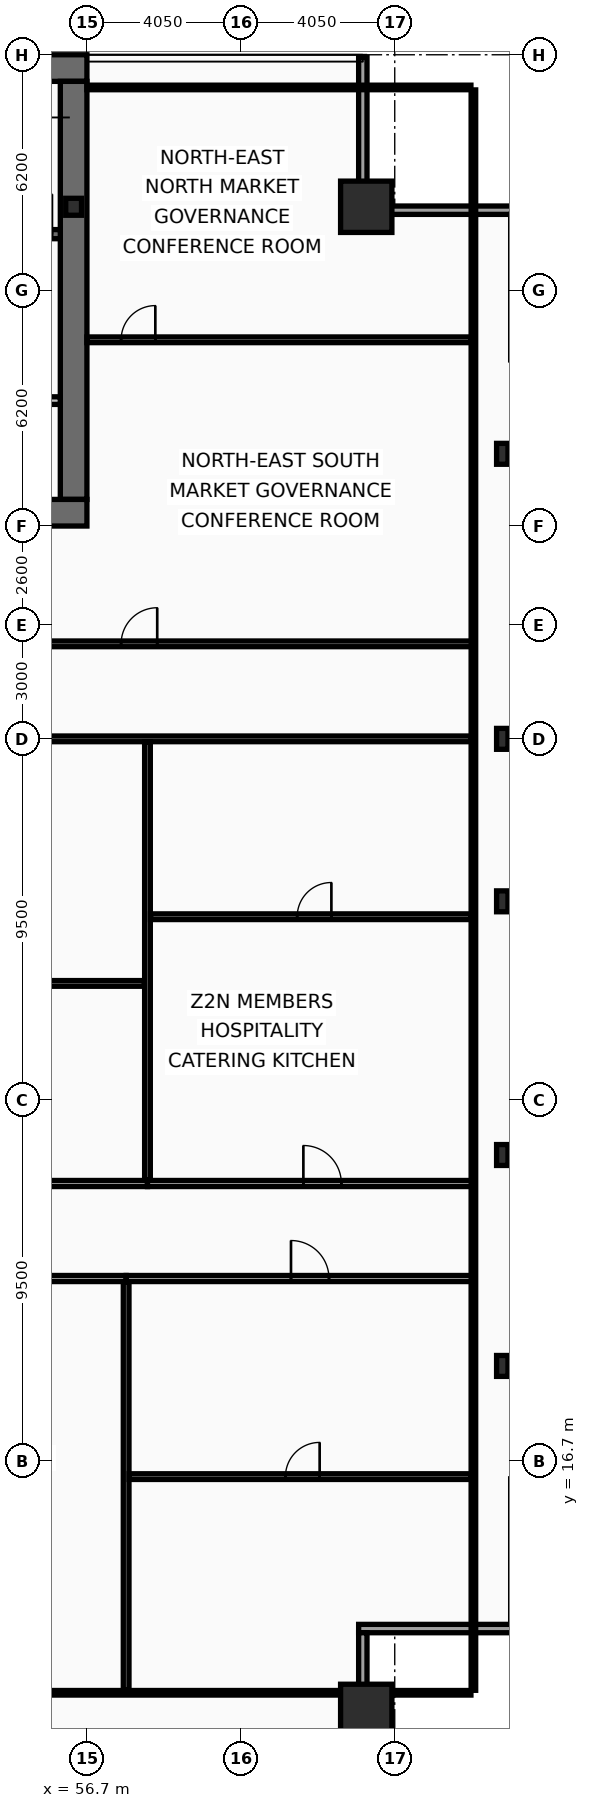
"""IFC4 building model, lengths in metres.
Left out: names, types, materials, properties, quantities, classifications, styles, units other than length and angle.
Written with IfcOpenShell. Run it as: python <this file> out.ifc"""

import sys

from ifc_helpers import new_model, si_unit, direction, frame, frame_2d, origin, origin_2d, place, context, subcontext, project, spatial, rectangle, hollow_rectangle, i_section, extrude, element, fill, save


model = new_model("IFC4")
c1 = context("Model", 3, precision=1e-05, world=origin(), true_north=direction((0.0, 1.0)))
c2 = subcontext(c1, "Body", "Model", "MODEL_VIEW")
j1 = project(units=[si_unit("LENGTHUNIT", "METRE"), si_unit("PLANEANGLEUNIT", "RADIAN")], contexts=[c1])
p1 = place(None, origin())
s1 = spatial("IfcSite", under=j1, at=p1, CompositionType="ELEMENT")
p2 = place(p1, origin())
s2 = spatial("IfcBuilding", under=s1, at=p2, CompositionType="ELEMENT")
p3 = place(p2, frame((0.0, 0.0, 161.4)))
s3 = spatial("IfcBuildingStorey", under=s2, at=p3, CompositionType="ELEMENT", Elevation=161.4)
p4 = place(p3, frame((16.2, 53.35, 0.0), z_axis=(0.0, 0.0, 1.0), x_axis=(1.0, 0.0, 0.0)))
e1 = element("IfcWall", 1, at=p4, inside=s3, PredefinedType="SHEAR", context=c2, shape_type="SweptSolid", body=[
    extrude(rectangle(XDim=40.5, YDim=0.7, at=frame_2d((20.25, 0.0))), origin(), (0.0, 0.0, 1.0), 3.44),
])
p5 = place(p3, frame((56.35, 53.0, 0.0), z_axis=(0.0, 0.0, 1.0), x_axis=(0.0, -1.0, 0.0)))
e2 = element("IfcWall", 2, at=p5, inside=s3, PredefinedType="SHEAR", context=c2, shape_type="SweptSolid", body=[
    extrude(rectangle(XDim=11.0, YDim=0.7, at=frame_2d((5.5, 0.0))), origin(), (0.0, 0.0, 1.0), 3.44),
])
p6 = place(p3, frame((56.7, 41.65, 0.0), z_axis=(0.0, 0.0, 1.0), x_axis=(-1.0, 0.0, 0.0)))
e3 = element("IfcWall", 3, at=p6, inside=s3, PredefinedType="SHEAR", context=c2, shape_type="SweptSolid", body=[
    extrude(rectangle(XDim=2.45, YDim=0.7, at=frame_2d((1.225, 0.0))), origin(), (0.0, 0.0, 1.0), 3.44),
])
p7 = place(p3, frame((48.63, 48.98, 0.0), z_axis=(0.0, 0.0, 1.0), x_axis=(1.0, 0.0, 0.0)))
e4 = element("IfcWall", 4, at=p7, inside=s3, PredefinedType="SHEAR", context=c2, shape_type="SweptSolid", body=[
    extrude(rectangle(XDim=7.37, YDim=0.24, at=frame_2d((3.685, 0.0))), origin(), (0.0, 0.0, 1.0), 3.44),
])
p8 = place(p7, frame((6.1, 0.0, 0.0)))
e5 = element("IfcOpeningElement", 5, at=p8, cuts=e4, PredefinedType="OPENING", context=c2, shape_type="SweptSolid", body=[
    extrude(rectangle(XDim=1.05, YDim=2.15, at=frame_2d((0.525, 1.075))), frame((0.0, 0.13, 0.0), z_axis=(0.0, -1.0, 0.0), x_axis=(1.0, 0.0, 0.0)), (0.0, 0.0, 1.0), 0.26),
])
for number, where, z_axis, x_axis in (
    (6, (64.05, 10.15, 0.0), (0.0, 0.0, 1.0), (1.0, 0.0, 0.0)),
    (7, (64.05, 49.7, 0.0), (0.0, 0.0, 1.0), (1.0, 0.0, 0.0)),
):
    element("IfcColumn", number, at=place(p3, frame(where, z_axis=z_axis, x_axis=x_axis)), inside=s3, PredefinedType="COLUMN", context=c2, shape_type="SweptSolid", body=[
        extrude(hollow_rectangle(XDim=1.35, YDim=1.35, WallThickness=0.065, at=origin_2d()), origin(), (0.0, 0.0, 1.0), 3.6),
    ])
for number, where, z_axis, x_axis in (
    (8, (67.63, 19.2, 0.0), (0.0, 0.0, 1.0), (1.0, 0.0, 0.0)),
    (9, (67.63, 24.75, 0.0), (0.0, 0.0, 1.0), (1.0, 0.0, 0.0)),
    (10, (67.63, 31.425, 0.0), (0.0, 0.0, 1.0), (1.0, 0.0, 0.0)),
    (11, (67.63, 35.7, 0.0), (0.0, 0.0, 1.0), (1.0, 0.0, 0.0)),
    (12, (67.63, 43.2, 0.0), (0.0, 0.0, 1.0), (1.0, 0.0, 0.0)),
):
    element("IfcColumn", number, at=place(p3, frame(where, z_axis=z_axis, x_axis=x_axis)), inside=s3, PredefinedType="COLUMN", context=c2, shape_type="SweptSolid", body=[
        extrude(i_section(OverallWidth=0.3, OverallDepth=0.55, WebThickness=0.015, FlangeThickness=0.029, at=origin_2d()), origin(), (0.0, 0.0, 1.0), 3.6),
    ])
p9 = place(p3, frame((56.35, 49.7, 0.0), z_axis=(0.0, 0.0, 1.0), x_axis=(1.0, 0.0, 0.0)))
e13 = element("IfcColumn", 13, at=p9, inside=s3, PredefinedType="COLUMN", context=c2, shape_type="SweptSolid", body=[
    extrude(i_section(OverallWidth=0.416, OverallDepth=0.446, WebThickness=0.039, FlangeThickness=0.063, at=origin_2d()), origin(), (0.0, 0.0, 1.0), 3.6),
])
p10 = place(p3, frame((63.96, 53.63, 0.0), z_axis=(0.0, 0.0, 1.0), x_axis=(0.0, -1.0, 0.0)))
e14 = element("IfcWall", 14, at=p10, inside=s3, PredefinedType="SOLIDWALL", context=c2, shape_type="SweptSolid", body=[
    extrude(rectangle(XDim=3.91, YDim=0.22, at=frame_2d((1.955, 0.0))), origin(), (0.0, 0.0, 1.0), 2.83),
])
for number, where, z_axis, x_axis in (
    (15, (63.85, 49.61, 0.0), (0.0, 0.0, 1.0), (1.0, 0.0, 0.0)),
    (16, (68.07, 12.29, 0.0), (0.0, 0.0, 1.0), (-1.0, 0.0, 0.0)),
):
    element("IfcWall", number, at=place(p3, frame(where, z_axis=z_axis, x_axis=x_axis)), inside=s3, PredefinedType="SOLIDWALL", context=c2, shape_type="SweptSolid", body=[
        extrude(rectangle(XDim=4.22, YDim=0.22, at=frame_2d((2.11, 0.0))), origin(), (0.0, 0.0, 1.0), 2.83),
    ])
p11 = place(p3, frame((63.96, 12.18, 0.0), z_axis=(0.0, 0.0, 1.0), x_axis=(0.0, -1.0, 0.0)))
e17 = element("IfcWall", 17, at=p11, inside=s3, PredefinedType="SOLIDWALL", context=c2, shape_type="SweptSolid", body=[
    extrude(rectangle(XDim=3.91, YDim=0.22, at=frame_2d((1.955, 0.0))), origin(), (0.0, 0.0, 1.0), 2.83),
])
p12 = place(p3, frame((51.9, 44.6, 0.0), z_axis=(0.0, 0.0, 1.0), x_axis=(1.0, 0.0, 0.0)))
e18 = element("IfcWall", 18, at=p12, inside=s3, PredefinedType="PARTITIONING", context=c2, shape_type="SweptSolid", body=[
    extrude(rectangle(XDim=4.1, YDim=0.2, at=frame_2d((2.05, 0.0))), origin(), (0.0, 0.0, 1.0), 3.44),
])
p13 = place(p12, frame((1.15, 0.0, 0.0)))
e19 = element("IfcOpeningElement", 19, at=p13, cuts=e18, PredefinedType="OPENING", context=c2, shape_type="SweptSolid", body=[
    extrude(rectangle(XDim=1.05, YDim=2.15, at=frame_2d((0.525, 1.075))), frame((0.0, 0.11, 0.0), z_axis=(0.0, -1.0, 0.0), x_axis=(1.0, 0.0, 0.0)), (0.0, 0.0, 1.0), 0.22),
])
p14 = place(p3, frame((54.35, 38.2, 0.0), z_axis=(0.0, 0.0, 1.0), x_axis=(1.0, 0.0, 0.0)))
e20 = element("IfcWall", 20, at=p14, inside=s3, PredefinedType="PARTITIONING", context=c2, shape_type="SweptSolid", body=[
    extrude(rectangle(XDim=12.52, YDim=0.15, at=frame_2d((6.26, 0.0))), origin(), (0.0, 0.0, 1.0), 2.73),
])
p15 = place(p14, frame((3.25, 0.0, 0.0)))
e21 = element("IfcOpeningElement", 21, at=p15, cuts=e20, PredefinedType="OPENING", context=c2, shape_type="SweptSolid", body=[
    extrude(rectangle(XDim=0.95, YDim=2.05, at=frame_2d((0.475, 1.025))), frame((0.0, 0.085, 0.0), z_axis=(0.0, -1.0, 0.0), x_axis=(1.0, 0.0, 0.0)), (0.0, 0.0, 1.0), 0.17),
])
p16 = place(p3, frame((56.7, 46.2, 0.0), z_axis=(0.0, 0.0, 1.0), x_axis=(1.0, 0.0, 0.0)))
e22 = element("IfcWall", 22, at=p16, inside=s3, PredefinedType="PARTITIONING", context=c2, shape_type="SweptSolid", body=[
    extrude(rectangle(XDim=10.105, YDim=0.15, at=frame_2d((5.052, 0.0))), origin(), (0.0, 0.0, 1.0), 2.83),
])
p17 = place(p16, frame((0.9, 0.0, 0.0)))
e23 = element("IfcOpeningElement", 23, at=p17, cuts=e22, PredefinedType="OPENING", context=c2, shape_type="SweptSolid", body=[
    extrude(rectangle(XDim=0.9, YDim=2.05, at=frame_2d((0.45, 1.025))), frame((0.0, 0.085, 0.0), z_axis=(0.0, -1.0, 0.0), x_axis=(1.0, 0.0, 0.0)), (0.0, 0.0, 1.0), 0.17),
])
p18 = place(p3, frame((49.632, 21.5, 0.0), z_axis=(0.0, 0.0, 1.0), x_axis=(1.0, 0.0, 0.0)))
e24 = element("IfcWall", 24, at=p18, inside=s3, PredefinedType="PARTITIONING", context=c2, shape_type="SweptSolid", body=[
    extrude(rectangle(XDim=8.1, YDim=0.16, at=frame_2d((4.05, 0.0))), origin(), (0.0, 0.0, 1.0), 2.73),
])
p19 = place(p18, frame((3.902, 0.0, 0.0)))
e25 = element("IfcOpeningElement", 25, at=p19, cuts=e24, PredefinedType="OPENING", context=c2, shape_type="SweptSolid", body=[
    extrude(rectangle(XDim=1.0, YDim=2.05, at=frame_2d((0.5, 1.025))), frame((0.0, 0.09, 0.0), z_axis=(0.0, -1.0, 0.0), x_axis=(1.0, 0.0, 0.0)), (0.0, 0.0, 1.0), 0.18),
])
p20 = place(p3, frame((57.732, 21.5, 0.0), z_axis=(0.0, 0.0, 1.0), x_axis=(1.0, 0.0, 0.0)))
e26 = element("IfcWall", 26, at=p20, inside=s3, PredefinedType="PARTITIONING", context=c2, shape_type="SweptSolid", body=[
    extrude(rectangle(XDim=9.138, YDim=0.16, at=frame_2d((4.569, 0.0))), origin(), (0.0, 0.0, 1.0), 3.44),
])
p21 = place(p20, frame((4.338, 0.0, 0.0)))
e27 = element("IfcOpeningElement", 27, at=p21, cuts=e26, PredefinedType="OPENING", context=c2, shape_type="SweptSolid", body=[
    extrude(rectangle(XDim=1.0, YDim=2.05, at=frame_2d((0.5, 1.025))), frame((0.0, 0.09, 0.0), z_axis=(0.0, -1.0, 0.0), x_axis=(1.0, 0.0, 0.0)), (0.0, 0.0, 1.0), 0.18),
])
p22 = place(p3, frame((57.732, 10.665, 0.0), z_axis=(0.0, 0.0, 1.0), x_axis=(0.0, 1.0, 0.0)))
e28 = element("IfcWall", 28, at=p22, inside=s3, PredefinedType="PARTITIONING", context=c2, shape_type="SweptSolid", body=[
    extrude(rectangle(XDim=10.75, YDim=0.15, at=frame_2d((5.375, 0.0))), origin(), (0.0, 0.0, 1.0), 2.73),
])
p23 = place(p3, frame((57.812, 16.288, 0.0), z_axis=(0.0, 0.0, 1.0), x_axis=(1.0, 0.0, 0.0)))
e29 = element("IfcWall", 29, at=p23, inside=s3, PredefinedType="PARTITIONING", context=c2, shape_type="SweptSolid", body=[
    extrude(rectangle(XDim=8.993, YDim=0.15, at=frame_2d((4.497, 0.0))), origin(), (0.0, 0.0, 1.0), 2.83),
])
p24 = place(p23, frame((4.112, 0.0, 0.0)))
e30 = element("IfcOpeningElement", 30, at=p24, cuts=e29, PredefinedType="OPENING", context=c2, shape_type="SweptSolid", body=[
    extrude(rectangle(XDim=0.9, YDim=2.05, at=frame_2d((0.45, 1.025))), frame((0.0, 0.085, 0.0), z_axis=(0.0, -1.0, 0.0), x_axis=(1.0, 0.0, 0.0)), (0.0, 0.0, 1.0), 0.17),
])
p25 = place(p3, frame((21.81, 35.7, 0.0), z_axis=(0.0, 0.0, 1.0), x_axis=(1.0, 0.0, 0.0)))
e31 = element("IfcWall", 31, at=p25, inside=s3, PredefinedType="PARTITIONING", context=c2, shape_type="SweptSolid", body=[
    extrude(rectangle(XDim=44.995, YDim=0.15, at=frame_2d((22.498, 0.0))), origin(), (0.0, 0.0, 1.0), 2.73),
])
p26 = place(p3, frame((48.814, 24.0, 0.0), z_axis=(0.0, 0.0, 1.0), x_axis=(1.0, 0.0, 0.0)))
e32 = element("IfcWall", 32, at=p26, inside=s3, PredefinedType="PARTITIONING", context=c2, shape_type="SweptSolid", body=[
    extrude(rectangle(XDim=9.479, YDim=0.16, at=frame_2d((4.74, 0.0))), origin(), (0.0, 0.0, 1.0), 2.73),
])
p27 = place(p26, frame((4.481, 0.0, 0.0)))
e33 = element("IfcOpeningElement", 33, at=p27, cuts=e32, PredefinedType="OPENING", context=c2, shape_type="SweptSolid", body=[
    extrude(rectangle(XDim=1.0, YDim=2.05, at=frame_2d((0.5, 1.025))), frame((0.0, 0.09, 0.0), z_axis=(0.0, -1.0, 0.0), x_axis=(1.0, 0.0, 0.0)), (0.0, 0.0, 1.0), 0.18),
])
p28 = place(p3, frame((48.894, 29.265, 0.0), z_axis=(0.0, 0.0, 1.0), x_axis=(1.0, 0.0, 0.0)))
e34 = element("IfcWall", 34, at=p28, inside=s3, PredefinedType="PARTITIONING", context=c2, shape_type="SweptSolid", body=[
    extrude(rectangle(XDim=9.319, YDim=0.15, at=frame_2d((4.66, 0.0))), origin(), (0.0, 0.0, 1.0), 2.73),
])
p29 = place(p28, frame((4.266, 0.0, 0.0)))
e35 = element("IfcOpeningElement", 35, at=p29, cuts=e34, PredefinedType="OPENING", context=c2, shape_type="SweptSolid", body=[
    extrude(rectangle(XDim=0.9, YDim=2.05, at=frame_2d((0.45, 1.025))), frame((0.0, 0.085, 0.0), z_axis=(0.0, -1.0, 0.0), x_axis=(1.0, 0.0, 0.0)), (0.0, 0.0, 1.0), 0.17),
])
p30 = place(p3, frame((58.293, 24.0, 0.0), z_axis=(0.0, 0.0, 1.0), x_axis=(1.0, 0.0, 0.0)))
e36 = element("IfcWall", 36, at=p30, inside=s3, PredefinedType="PARTITIONING", context=c2, shape_type="SweptSolid", body=[
    extrude(rectangle(XDim=8.577, YDim=0.16, at=frame_2d((4.288, 0.0))), origin(), (0.0, 0.0, 1.0), 3.44),
])
p31 = place(p30, frame((4.102, 0.0, 0.0)))
e37 = element("IfcOpeningElement", 37, at=p31, cuts=e36, PredefinedType="OPENING", context=c2, shape_type="SweptSolid", body=[
    extrude(rectangle(XDim=1.0, YDim=2.05, at=frame_2d((0.5, 1.025))), frame((0.0, 0.09, 0.0), z_axis=(0.0, -1.0, 0.0), x_axis=(1.0, 0.0, 0.0)), (0.0, 0.0, 1.0), 0.18),
])
p32 = place(p3, frame((58.293, 24.085, 0.0), z_axis=(0.0, 0.0, 1.0), x_axis=(0.0, 1.0, 0.0)))
e38 = element("IfcWall", 38, at=p32, inside=s3, PredefinedType="PARTITIONING", context=c2, shape_type="SweptSolid", body=[
    extrude(rectangle(XDim=11.535, YDim=0.15, at=frame_2d((5.768, 0.0))), origin(), (0.0, 0.0, 1.0), 2.73),
])
p33 = place(p3, frame((58.373, 31.02, 0.0), z_axis=(0.0, 0.0, 1.0), x_axis=(1.0, 0.0, 0.0)))
e39 = element("IfcWall", 39, at=p33, inside=s3, PredefinedType="PARTITIONING", context=c2, shape_type="SweptSolid", body=[
    extrude(rectangle(XDim=8.432, YDim=0.15, at=frame_2d((4.216, 0.0))), origin(), (0.0, 0.0, 1.0), 2.73),
])
p34 = place(p33, frame((3.86, 0.0, 0.0)))
e40 = element("IfcOpeningElement", 40, at=p34, cuts=e39, PredefinedType="OPENING", context=c2, shape_type="SweptSolid", body=[
    extrude(rectangle(XDim=0.9, YDim=2.05, at=frame_2d((0.45, 1.025))), frame((0.0, 0.085, 0.0), z_axis=(0.0, -1.0, 0.0), x_axis=(1.0, 0.0, 0.0)), (0.0, 0.0, 1.0), 0.17),
])
p35 = place(p3, frame((66.87, 10.665, 0.0), z_axis=(0.0, 0.0, 1.0), x_axis=(0.0, 1.0, 0.0)))
e41 = element("IfcWall", 41, at=p35, inside=s3, PredefinedType="PARTITIONING", context=c2, shape_type="SweptSolid", body=[
    extrude(rectangle(XDim=42.11, YDim=0.12, at=frame_2d((21.055, 0.0))), origin(), (0.0, 0.0, 1.0), 2.73),
])
p36 = place(p3, frame((56.7, 52.84, 0.0), z_axis=(0.0, 0.0, 1.0), x_axis=(1.0, 0.0, 0.0)))
e42 = element("IfcWall", 42, at=p36, inside=s3, PredefinedType="PARTITIONING", context=c2, shape_type="SweptSolid", body=[
    extrude(rectangle(XDim=10.105, YDim=0.12, at=frame_2d((5.052, 0.0))), origin(), (0.0, 0.0, 1.0), 3.44),
])
p37 = place(p3, frame((6.095, 10.6, 0.0), z_axis=(0.0, 0.0, 1.0), x_axis=(1.0, 0.0, 0.0)))
e43 = element("IfcWall", 43, at=p37, inside=s3, PredefinedType="PARTITIONING", context=c2, shape_type="SweptSolid", body=[
    extrude(rectangle(XDim=60.71, YDim=0.12, at=frame_2d((30.355, 0.0))), origin(), (0.0, 0.0, 1.0), 2.73),
])
p38 = place(p15, origin())
e44 = element("IfcDoor", 44, at=p38, inside=s3, OperationType="SINGLE_SWING_RIGHT", PredefinedType="DOOR", context=c2, shape_type="SweptSolid", body=[
    extrude(rectangle(XDim=0.95, YDim=2.05, at=frame_2d((0.475, 1.025))), frame((0.0, 0.025, 0.0), z_axis=(0.0, -1.0, 0.0), x_axis=(1.0, 0.0, 0.0)), (0.0, 0.0, 1.0), 0.05),
])
fill(e21, e44)
p39 = place(p17, origin())
e45 = element("IfcDoor", 45, at=p39, inside=s3, OperationType="SINGLE_SWING_RIGHT", PredefinedType="DOOR", context=c2, shape_type="SweptSolid", body=[
    extrude(rectangle(XDim=0.9, YDim=2.05, at=frame_2d((0.45, 1.025))), frame((0.0, 0.025, 0.0), z_axis=(0.0, -1.0, 0.0), x_axis=(1.0, 0.0, 0.0)), (0.0, 0.0, 1.0), 0.05),
])
fill(e23, e45)
p40 = place(p21, origin())
e46 = element("IfcDoor", 46, at=p40, inside=s3, OperationType="SINGLE_SWING_LEFT", PredefinedType="DOOR", context=c2, shape_type="SweptSolid", body=[
    extrude(rectangle(XDim=1.0, YDim=2.05, at=frame_2d((0.5, 1.025))), frame((0.0, 0.025, 0.0), z_axis=(0.0, -1.0, 0.0), x_axis=(1.0, 0.0, 0.0)), (0.0, 0.0, 1.0), 0.05),
])
fill(e27, e46)
p41 = place(p24, origin())
e47 = element("IfcDoor", 47, at=p41, inside=s3, OperationType="SINGLE_SWING_RIGHT", PredefinedType="DOOR", context=c2, shape_type="SweptSolid", body=[
    extrude(rectangle(XDim=0.9, YDim=2.05, at=frame_2d((0.45, 1.025))), frame((0.0, 0.025, 0.0), z_axis=(0.0, -1.0, 0.0), x_axis=(1.0, 0.0, 0.0)), (0.0, 0.0, 1.0), 0.05),
])
fill(e30, e47)
p42 = place(p31, origin())
e48 = element("IfcDoor", 48, at=p42, inside=s3, OperationType="SINGLE_SWING_LEFT", PredefinedType="DOOR", context=c2, shape_type="SweptSolid", body=[
    extrude(rectangle(XDim=1.0, YDim=2.05, at=frame_2d((0.5, 1.025))), frame((0.0, 0.025, 0.0), z_axis=(0.0, -1.0, 0.0), x_axis=(1.0, 0.0, 0.0)), (0.0, 0.0, 1.0), 0.05),
])
fill(e37, e48)
p43 = place(p34, origin())
e49 = element("IfcDoor", 49, at=p43, inside=s3, OperationType="SINGLE_SWING_RIGHT", PredefinedType="DOOR", context=c2, shape_type="SweptSolid", body=[
    extrude(rectangle(XDim=0.9, YDim=2.05, at=frame_2d((0.45, 1.025))), frame((0.0, 0.025, 0.0), z_axis=(0.0, -1.0, 0.0), x_axis=(1.0, 0.0, 0.0)), (0.0, 0.0, 1.0), 0.05),
])
fill(e40, e49)
save(model, sys.argv[1])
